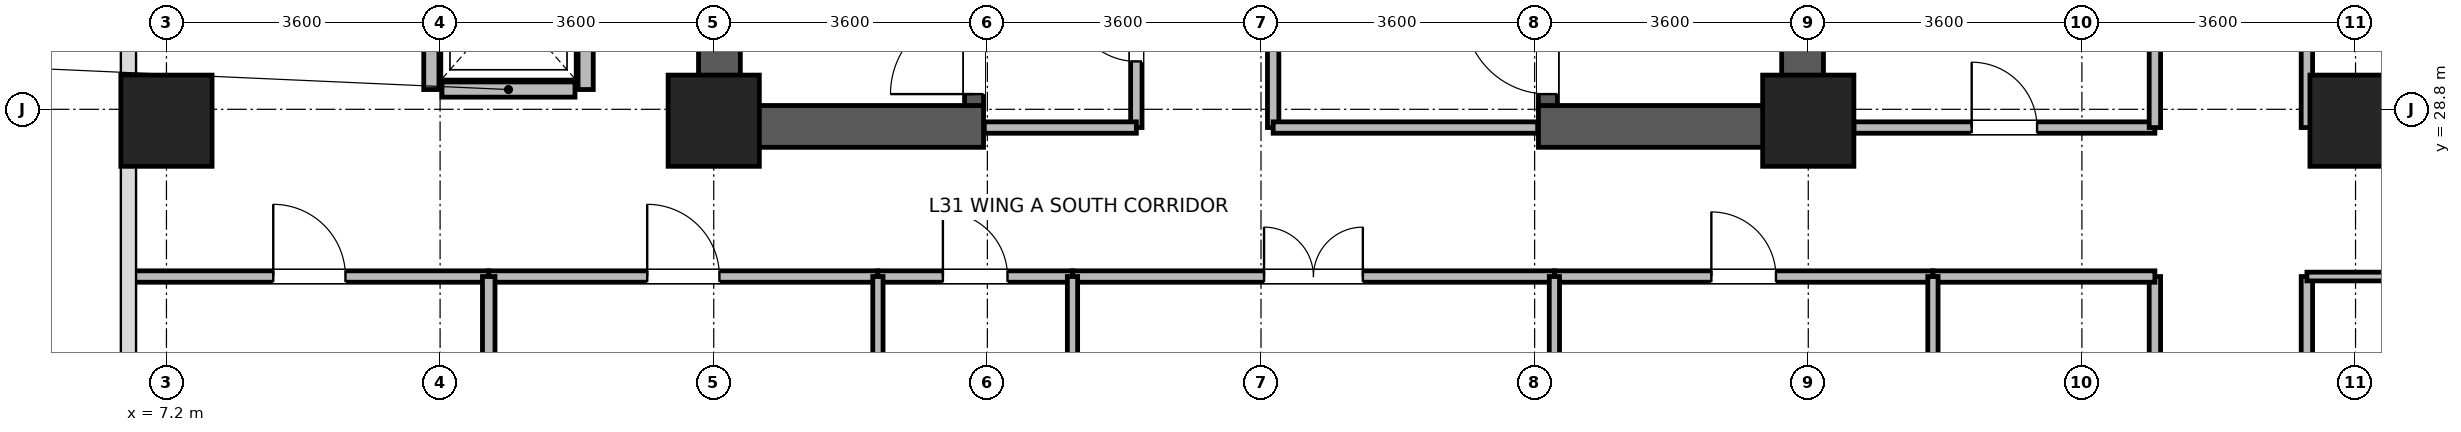
"""IFC4 building model, lengths in metres.
Left out: names, types, materials, properties, quantities, classifications, styles, units other than length and angle.
Written with IfcOpenShell. Run it as: python <this file> out.ifc"""

import sys

from ifc_helpers import new_model, si_unit, direction, frame, frame_2d, origin, origin_2d, place, context, subcontext, project, spatial, rectangle, extrude, source, transform, mapped, element, fill, save


model = new_model("IFC4")
c1 = context("Model", 3, precision=1e-05, world=origin(), true_north=direction((0.0, 1.0)))
c2 = subcontext(c1, "Body", "Model", "MODEL_VIEW")
j1 = project(units=[si_unit("LENGTHUNIT", "METRE"), si_unit("PLANEANGLEUNIT", "RADIAN")], contexts=[c1])
p1 = place(None, origin())
s1 = spatial("IfcSite", under=j1, at=p1, CompositionType="ELEMENT")
p2 = place(p1, origin())
s2 = spatial("IfcBuilding", under=s1, at=p2, CompositionType="ELEMENT")
p3 = place(p2, frame((0.0, 0.0, 123.0)))
s3 = spatial("IfcBuildingStorey", under=s2, at=p3, CompositionType="ELEMENT", Elevation=123.0)
for number, where, z_axis, x_axis in (
    (1, (14.475, 28.3, 0.0), (0.0, 0.0, 1.0), (0.0, 1.0, 0.0)),
    (2, (28.725, 28.3, 0.0), (0.0, 0.0, 1.0), (0.0, 1.0, 0.0)),
):
    element("IfcWall", number, at=place(p3, frame(where, z_axis=z_axis, x_axis=x_axis)), inside=s3, PredefinedType="SHEAR", context=c2, shape_type="SweptSolid", body=[
        extrude(rectangle(XDim=8.1, YDim=0.55, at=frame_2d((4.05, 0.0))), origin(), (0.0, 0.0, 1.0), 3.45),
    ])
for number, where, z_axis, x_axis in (
    (3, (14.75, 28.575, 0.0), (0.0, 0.0, 1.0), (1.0, 0.0, 0.0)),
    (4, (25.25, 28.575, 0.0), (0.0, 0.0, 1.0), (1.0, 0.0, 0.0)),
):
    element("IfcWall", number, at=place(p3, frame(where, z_axis=z_axis, x_axis=x_axis)), inside=s3, PredefinedType="SHEAR", context=c2, shape_type="SweptSolid", body=[
        extrude(rectangle(XDim=3.2, YDim=0.55, at=frame_2d((1.6, 0.0))), origin(), (0.0, 0.0, 1.0), 3.45),
    ])
p4 = place(p3, frame((17.825, 28.85, 0.0), z_axis=(0.0, 0.0, 1.0), x_axis=(0.0, 1.0, 0.0)))
e5 = element("IfcWall", 5, at=p4, inside=s3, PredefinedType="SHEAR", context=c2, shape_type="SweptSolid", body=[
    extrude(rectangle(XDim=7.0, YDim=0.25, at=frame_2d((3.5, 0.0))), origin(), (0.0, 0.0, 1.0), 3.45),
])
p5 = place(p4, frame((0.15, 0.0, 0.0)))
e6 = element("IfcOpeningElement", 6, at=p5, cuts=e5, PredefinedType="OPENING", context=c2, shape_type="SweptSolid", body=[
    extrude(rectangle(XDim=1.1, YDim=2.08, at=frame_2d((0.55, 1.04))), frame((0.0, 0.135, 0.0), z_axis=(0.0, -1.0, 0.0), x_axis=(1.0, 0.0, 0.0)), (0.0, 0.0, 1.0), 0.27),
])
p6 = place(p3, frame((25.375, 28.85, 0.0), z_axis=(0.0, 0.0, 1.0), x_axis=(0.0, 1.0, 0.0)))
e7 = element("IfcWall", 7, at=p6, inside=s3, PredefinedType="SHEAR", context=c2, shape_type="SweptSolid", body=[
    extrude(rectangle(XDim=7.0, YDim=0.25, at=frame_2d((3.5, 0.0))), origin(), (0.0, 0.0, 1.0), 3.45),
])
p7 = place(p6, frame((0.15, 0.0, 0.0)))
e8 = element("IfcOpeningElement", 8, at=p7, cuts=e7, PredefinedType="OPENING", context=c2, shape_type="SweptSolid", body=[
    extrude(rectangle(XDim=1.1, YDim=2.08, at=frame_2d((0.55, 1.04))), frame((0.0, 0.135, 0.0), z_axis=(0.0, -1.0, 0.0), x_axis=(1.0, 0.0, 0.0)), (0.0, 0.0, 1.0), 0.27),
])
m1 = source(origin(), c2, "Body", "SweptSolid", [
    extrude(rectangle(XDim=1.2, YDim=1.2, at=origin_2d()), origin(), (0.0, 0.0, 1.0), 3.7),
])
for number, where, z_axis, x_axis in (
    (9, (7.2, 28.65, 0.0), (0.0, 0.0, 1.0), (1.0, 0.0, 0.0)),
    (10, (14.4, 28.65, 0.0), (0.0, 0.0, 1.0), (1.0, 0.0, 0.0)),
    (11, (28.8, 28.65, 0.0), (0.0, 0.0, 1.0), (1.0, 0.0, 0.0)),
    (12, (36.0, 28.65, 0.0), (0.0, 0.0, 1.0), (1.0, 0.0, 0.0)),
):
    element("IfcColumn", number, at=place(p3, frame(where, z_axis=z_axis, x_axis=x_axis)), inside=s3, PredefinedType="COLUMN", context=c2, shape_type="MappedRepresentation", body=[
        mapped(m1, transform((0.0, 0.0, 0.0), x_axis=(1.0, 0.0, 0.0), y_axis=(0.0, 1.0, 0.0), z_axis=(0.0, 0.0, 1.0), scale=1.0)),
    ])
p8 = place(p3, frame((10.825, 29.06, 0.0), z_axis=(0.0, 0.0, 1.0), x_axis=(1.0, 0.0, 0.0)))
e13 = element("IfcWall", 13, at=p8, inside=s3, PredefinedType="PARTITIONING", context=c2, shape_type="SweptSolid", body=[
    extrude(rectangle(XDim=1.75, YDim=0.2, at=frame_2d((0.875, 0.0))), origin(), (0.0, 0.0, 1.0), 3.43),
])
for number, where, z_axis, x_axis in (
    (14, (10.685, 29.06, 0.0), (0.0, 0.0, 1.0), (0.0, 1.0, 0.0)),
    (15, (12.715, 29.06, 0.0), (0.0, 0.0, 1.0), (0.0, 1.0, 0.0)),
):
    element("IfcWall", number, at=place(p3, frame(where, z_axis=z_axis, x_axis=x_axis)), inside=s3, PredefinedType="PARTITIONING", context=c2, shape_type="SweptSolid", body=[
        extrude(rectangle(XDim=2.28, YDim=0.2, at=frame_2d((1.14, 0.0))), origin(), (0.0, 0.0, 1.0), 3.43),
    ])
p9 = place(p3, frame((35.36, 16.96, 0.0), z_axis=(0.0, 0.0, 1.0), x_axis=(0.0, 1.0, 0.0)))
e16 = element("IfcWall", 16, at=p9, inside=s3, PredefinedType="PARTITIONING", context=c2, shape_type="SweptSolid", body=[
    extrude(rectangle(XDim=9.64, YDim=0.15, at=frame_2d((4.82, 0.0))), origin(), (0.0, 0.0, 1.0), 3.43),
])
p10 = place(p9, frame((2.435, 0.0, 0.0)))
e17 = element("IfcOpeningElement", 17, at=p10, cuts=e16, PredefinedType="OPENING", context=c2, shape_type="SweptSolid", body=[
    extrude(rectangle(XDim=1.3, YDim=2.12, at=frame_2d((0.65, 1.06))), frame((0.0, 0.085, 0.0), z_axis=(0.0, -1.0, 0.0), x_axis=(1.0, 0.0, 0.0)), (0.0, 0.0, 1.0), 0.17),
])
p11 = place(p3, frame((35.36, 28.56, 0.0), z_axis=(0.0, 0.0, 1.0), x_axis=(0.0, 1.0, 0.0)))
e18 = element("IfcWall", 18, at=p11, inside=s3, PredefinedType="PARTITIONING", context=c2, shape_type="SweptSolid", body=[
    extrude(rectangle(XDim=7.68, YDim=0.15, at=frame_2d((3.84, 0.0))), origin(), (0.0, 0.0, 1.0), 3.43),
])
p12 = place(p11, frame((3.19, 0.0, 0.0)))
e19 = element("IfcOpeningElement", 19, at=p12, cuts=e18, PredefinedType="OPENING", context=c2, shape_type="SweptSolid", body=[
    extrude(rectangle(XDim=1.3, YDim=2.12, at=frame_2d((0.65, 1.06))), frame((0.0, 0.085, 0.0), z_axis=(0.0, -1.0, 0.0), x_axis=(1.0, 0.0, 0.0)), (0.0, 0.0, 1.0), 0.17),
])
p13 = place(p3, frame((19.12, 26.6, 0.0), z_axis=(0.0, 0.0, 1.0), x_axis=(1.0, 0.0, 0.0)))
e20 = element("IfcWall", 20, at=p13, inside=s3, PredefinedType="PARTITIONING", context=c2, shape_type="SweptSolid", body=[
    extrude(rectangle(XDim=6.34, YDim=0.15, at=frame_2d((3.17, 0.0))), origin(), (0.0, 0.0, 1.0), 3.43),
])
p14 = place(p13, frame((2.52, 0.0, 0.0)))
e21 = element("IfcOpeningElement", 21, at=p14, cuts=e20, PredefinedType="OPENING", context=c2, shape_type="SweptSolid", body=[
    extrude(rectangle(XDim=1.3, YDim=2.12, at=frame_2d((0.65, 1.06))), frame((0.0, 0.085, 0.0), z_axis=(0.0, -1.0, 0.0), x_axis=(1.0, 0.0, 0.0)), (0.0, 0.0, 1.0), 0.17),
])
p15 = place(p3, frame((11.44, 26.6, 0.0), z_axis=(0.0, 0.0, 1.0), x_axis=(1.0, 0.0, 0.0)))
e22 = element("IfcWall", 22, at=p15, inside=s3, PredefinedType="PARTITIONING", context=c2, shape_type="SweptSolid", body=[
    extrude(rectangle(XDim=5.12, YDim=0.15, at=frame_2d((2.56, 0.0))), origin(), (0.0, 0.0, 1.0), 3.43),
])
p16 = place(p15, frame((2.085, 0.0, 0.0)))
e23 = element("IfcOpeningElement", 23, at=p16, cuts=e22, PredefinedType="OPENING", context=c2, shape_type="SweptSolid", body=[
    extrude(rectangle(XDim=0.95, YDim=2.1, at=frame_2d((0.475, 1.05))), frame((0.0, 0.085, 0.0), z_axis=(0.0, -1.0, 0.0), x_axis=(1.0, 0.0, 0.0)), (0.0, 0.0, 1.0), 0.17),
])
p17 = place(p3, frame((33.36, 21.6, 0.0), z_axis=(0.0, 0.0, 1.0), x_axis=(0.0, 1.0, 0.0)))
e24 = element("IfcWall", 24, at=p17, inside=s3, PredefinedType="PARTITIONING", context=c2, shape_type="SweptSolid", body=[
    extrude(rectangle(XDim=5.0, YDim=0.15, at=frame_2d((2.5, 0.0))), origin(), (0.0, 0.0, 1.0), 3.43),
])
p18 = place(p17, frame((2.07, 0.0, 0.0)))
e25 = element("IfcOpeningElement", 25, at=p18, cuts=e24, PredefinedType="OPENING", context=c2, shape_type="SweptSolid", body=[
    extrude(rectangle(XDim=0.86, YDim=2.02, at=frame_2d((0.43, 1.01))), frame((0.0, 0.085, 0.0), z_axis=(0.0, -1.0, 0.0), x_axis=(1.0, 0.0, 0.0)), (0.0, 0.0, 1.0), 0.17),
])
p19 = place(p3, frame((25.46, 26.6, 0.0), z_axis=(0.0, 0.0, 1.0), x_axis=(1.0, 0.0, 0.0)))
e26 = element("IfcWall", 26, at=p19, inside=s3, PredefinedType="PARTITIONING", context=c2, shape_type="SweptSolid", body=[
    extrude(rectangle(XDim=4.98, YDim=0.15, at=frame_2d((2.49, 0.0))), origin(), (0.0, 0.0, 1.0), 3.43),
])
p20 = place(p19, frame((2.065, 0.0, 0.0)))
e27 = element("IfcOpeningElement", 27, at=p20, cuts=e26, PredefinedType="OPENING", context=c2, shape_type="SweptSolid", body=[
    extrude(rectangle(XDim=0.85, YDim=2.04, at=frame_2d((0.425, 1.02))), frame((0.0, 0.085, 0.0), z_axis=(0.0, -1.0, 0.0), x_axis=(1.0, 0.0, 0.0)), (0.0, 0.0, 1.0), 0.17),
])
p21 = place(p3, frame((6.72, 26.6, 0.0), z_axis=(0.0, 0.0, 1.0), x_axis=(1.0, 0.0, 0.0)))
e28 = element("IfcWall", 28, at=p21, inside=s3, PredefinedType="PARTITIONING", context=c2, shape_type="SweptSolid", body=[
    extrude(rectangle(XDim=4.72, YDim=0.15, at=frame_2d((2.36, 0.0))), origin(), (0.0, 0.0, 1.0), 3.43),
])
p22 = place(p21, frame((1.885, 0.0, 0.0)))
e29 = element("IfcOpeningElement", 29, at=p22, cuts=e28, PredefinedType="OPENING", context=c2, shape_type="SweptSolid", body=[
    extrude(rectangle(XDim=0.95, YDim=2.1, at=frame_2d((0.475, 1.05))), frame((0.0, 0.085, 0.0), z_axis=(0.0, -1.0, 0.0), x_axis=(1.0, 0.0, 0.0)), (0.0, 0.0, 1.0), 0.17),
])
p23 = place(p3, frame((29.4, 28.56, 0.0), z_axis=(0.0, 0.0, 1.0), x_axis=(1.0, 0.0, 0.0)))
e30 = element("IfcWall", 30, at=p23, inside=s3, PredefinedType="PARTITIONING", context=c2, shape_type="SweptSolid", body=[
    extrude(rectangle(XDim=3.96, YDim=0.15, at=frame_2d((1.98, 0.0))), origin(), (0.0, 0.0, 1.0), 2.78),
])
p24 = place(p23, frame((1.55, 0.0, 0.0)))
e31 = element("IfcOpeningElement", 31, at=p24, cuts=e30, PredefinedType="OPENING", context=c2, shape_type="SweptSolid", body=[
    extrude(rectangle(XDim=0.86, YDim=2.02, at=frame_2d((0.43, 1.01))), frame((0.0, 0.085, 0.0), z_axis=(0.0, -1.0, 0.0), x_axis=(1.0, 0.0, 0.0)), (0.0, 0.0, 1.0), 0.17),
])
p25 = place(p3, frame((33.36, 28.56, 0.0), z_axis=(0.0, 0.0, 1.0), x_axis=(0.0, 1.0, 0.0)))
e32 = element("IfcWall", 32, at=p25, inside=s3, PredefinedType="PARTITIONING", context=c2, shape_type="SweptSolid", body=[
    extrude(rectangle(XDim=3.84, YDim=0.15, at=frame_2d((1.92, 0.0))), origin(), (0.0, 0.0, 1.0), 3.43),
])
p26 = place(p3, frame((30.44, 26.6, 0.0), z_axis=(0.0, 0.0, 1.0), x_axis=(1.0, 0.0, 0.0)))
e33 = element("IfcWall", 33, at=p26, inside=s3, PredefinedType="PARTITIONING", context=c2, shape_type="SweptSolid", body=[
    extrude(rectangle(XDim=2.92, YDim=0.15, at=frame_2d((1.46, 0.0))), origin(), (0.0, 0.0, 1.0), 3.43),
])
p27 = place(p3, frame((19.96, 28.56, 0.0), z_axis=(0.0, 0.0, 1.0), x_axis=(0.0, 1.0, 0.0)))
e34 = element("IfcWall", 34, at=p27, inside=s3, PredefinedType="PARTITIONING", context=c2, shape_type="SweptSolid", body=[
    extrude(rectangle(XDim=2.6, YDim=0.15, at=frame_2d((1.3, 0.0))), origin(), (0.0, 0.0, 1.0), 3.43),
])
p28 = place(p27, frame((0.87, 0.0, 0.0)))
e35 = element("IfcOpeningElement", 35, at=p28, cuts=e34, PredefinedType="OPENING", context=c2, shape_type="SweptSolid", body=[
    extrude(rectangle(XDim=0.86, YDim=2.02, at=frame_2d((0.43, 1.01))), frame((0.0, 0.085, 0.0), z_axis=(0.0, -1.0, 0.0), x_axis=(1.0, 0.0, 0.0)), (0.0, 0.0, 1.0), 0.17),
])
p29 = place(p3, frame((16.56, 26.6, 0.0), z_axis=(0.0, 0.0, 1.0), x_axis=(1.0, 0.0, 0.0)))
e36 = element("IfcWall", 36, at=p29, inside=s3, PredefinedType="PARTITIONING", context=c2, shape_type="SweptSolid", body=[
    extrude(rectangle(XDim=2.56, YDim=0.15, at=frame_2d((1.28, 0.0))), origin(), (0.0, 0.0, 1.0), 3.43),
])
p30 = place(p29, frame((0.855, 0.0, 0.0)))
e37 = element("IfcOpeningElement", 37, at=p30, cuts=e36, PredefinedType="OPENING", context=c2, shape_type="SweptSolid", body=[
    extrude(rectangle(XDim=0.85, YDim=2.04, at=frame_2d((0.425, 1.02))), frame((0.0, 0.085, 0.0), z_axis=(0.0, -1.0, 0.0), x_axis=(1.0, 0.0, 0.0)), (0.0, 0.0, 1.0), 0.17),
])
p31 = place(p3, frame((17.96, 28.56, 0.0), z_axis=(0.0, 0.0, 1.0), x_axis=(1.0, 0.0, 0.0)))
e38 = element("IfcWall", 38, at=p31, inside=s3, PredefinedType="PARTITIONING", context=c2, shape_type="SweptSolid", body=[
    extrude(rectangle(XDim=2.0, YDim=0.15, at=frame_2d((1.0, 0.0))), origin(), (0.0, 0.0, 1.0), 2.43),
])
p32 = place(p3, frame((11.44, 21.732, 0.0), z_axis=(0.0, 0.0, 1.0), x_axis=(0.0, 1.0, 0.0)))
e39 = element("IfcWall", 39, at=p32, inside=s3, PredefinedType="PARTITIONING", context=c2, shape_type="SweptSolid", body=[
    extrude(rectangle(XDim=4.868, YDim=0.165, at=frame_2d((2.434, 0.0))), origin(), (0.0, 0.0, 1.0), 3.43),
])
for number, where, z_axis, x_axis in (
    (40, (16.56, 21.732, 0.0), (0.0, 0.0, 1.0), (0.0, 1.0, 0.0)),
    (41, (19.12, 21.732, 0.0), (0.0, 0.0, 1.0), (0.0, 1.0, 0.0)),
    (42, (25.46, 21.732, 0.0), (0.0, 0.0, 1.0), (0.0, 1.0, 0.0)),
    (43, (30.44, 21.732, 0.0), (0.0, 0.0, 1.0), (0.0, 1.0, 0.0)),
):
    element("IfcWall", number, at=place(p3, frame(where, z_axis=z_axis, x_axis=x_axis)), inside=s3, PredefinedType="PARTITIONING", context=c2, shape_type="SweptSolid", body=[
        extrude(rectangle(XDim=4.868, YDim=0.135, at=frame_2d((2.434, 0.0))), origin(), (0.0, 0.0, 1.0), 3.43),
    ])
p33 = place(p3, frame((21.76, 28.56, 0.0), z_axis=(0.0, 0.0, 1.0), x_axis=(0.0, 1.0, 0.0)))
e44 = element("IfcWall", 44, at=p33, inside=s3, PredefinedType="PARTITIONING", context=c2, shape_type="SweptSolid", body=[
    extrude(rectangle(XDim=4.6, YDim=0.15, at=frame_2d((2.3, 0.0))), origin(), (0.0, 0.0, 1.0), 3.43),
])
p34 = place(p33, frame((1.55, 0.0, 0.0)))
e45 = element("IfcOpeningElement", 45, at=p34, cuts=e44, PredefinedType="OPENING", context=c2, shape_type="SweptSolid", body=[
    extrude(rectangle(XDim=1.5, YDim=2.1, at=frame_2d((0.75, 1.05))), frame((0.0, 0.085, 0.0), z_axis=(0.0, -1.0, 0.0), x_axis=(1.0, 0.0, 0.0)), (0.0, 0.0, 1.0), 0.17),
])
p35 = place(p3, frame((21.76, 28.56, 0.0), z_axis=(0.0, 0.0, 1.0), x_axis=(1.0, 0.0, 0.0)))
e46 = element("IfcWall", 46, at=p35, inside=s3, PredefinedType="PARTITIONING", context=c2, shape_type="SweptSolid", body=[
    extrude(rectangle(XDim=3.48, YDim=0.15, at=frame_2d((1.74, 0.0))), origin(), (0.0, 0.0, 1.0), 2.43),
])
p36 = place(p3, frame((35.36, 26.6, 0.0), z_axis=(0.0, 0.0, 1.0), x_axis=(1.0, 0.0, 0.0)))
e47 = element("IfcWall", 47, at=p36, inside=s3, PredefinedType="PARTITIONING", context=c2, shape_type="SweptSolid", body=[
    extrude(rectangle(XDim=3.26, YDim=0.115, at=frame_2d((1.63, 0.0))), origin(), (0.0, 0.0, 1.0), 3.43),
])
p37 = place(p5, origin())
e48 = element("IfcDoor", 48, at=p37, inside=s3, OperationType="SINGLE_SWING_LEFT", PredefinedType="DOOR", context=c2, shape_type="SweptSolid", body=[
    extrude(rectangle(XDim=1.1, YDim=2.08, at=frame_2d((0.55, 1.04))), frame((0.0, 0.025, 0.0), z_axis=(0.0, -1.0, 0.0), x_axis=(1.0, 0.0, 0.0)), (0.0, 0.0, 1.0), 0.05),
])
fill(e6, e48)
p38 = place(p7, origin())
e49 = element("IfcDoor", 49, at=p38, inside=s3, OperationType="SINGLE_SWING_RIGHT", PredefinedType="DOOR", context=c2, shape_type="SweptSolid", body=[
    extrude(rectangle(XDim=1.1, YDim=2.08, at=frame_2d((0.55, 1.04))), frame((0.0, 0.025, 0.0), z_axis=(0.0, -1.0, 0.0), x_axis=(1.0, 0.0, 0.0)), (0.0, 0.0, 1.0), 0.05),
])
fill(e8, e49)
p39 = place(p14, origin())
e50 = element("IfcDoor", 50, at=p39, inside=s3, OperationType="DOUBLE_DOOR_SINGLE_SWING", PredefinedType="DOOR", context=c2, shape_type="SweptSolid", body=[
    extrude(rectangle(XDim=1.3, YDim=2.12, at=frame_2d((0.65, 1.06))), frame((0.0, 0.025, 0.0), z_axis=(0.0, -1.0, 0.0), x_axis=(1.0, 0.0, 0.0)), (0.0, 0.0, 1.0), 0.05),
])
fill(e21, e50)
p40 = place(p16, origin())
e51 = element("IfcDoor", 51, at=p40, inside=s3, OperationType="SINGLE_SWING_LEFT", PredefinedType="DOOR", context=c2, shape_type="SweptSolid", body=[
    extrude(rectangle(XDim=0.95, YDim=2.1, at=frame_2d((0.475, 1.05))), frame((0.0, 0.025, 0.0), z_axis=(0.0, -1.0, 0.0), x_axis=(1.0, 0.0, 0.0)), (0.0, 0.0, 1.0), 0.05),
])
fill(e23, e51)
p41 = place(p20, origin())
e52 = element("IfcDoor", 52, at=p41, inside=s3, OperationType="SINGLE_SWING_LEFT", PredefinedType="DOOR", context=c2, shape_type="SweptSolid", body=[
    extrude(rectangle(XDim=0.85, YDim=2.04, at=frame_2d((0.425, 1.02))), frame((0.0, 0.025, 0.0), z_axis=(0.0, -1.0, 0.0), x_axis=(1.0, 0.0, 0.0)), (0.0, 0.0, 1.0), 0.05),
])
fill(e27, e52)
p42 = place(p22, origin())
e53 = element("IfcDoor", 53, at=p42, inside=s3, OperationType="SINGLE_SWING_LEFT", PredefinedType="DOOR", context=c2, shape_type="SweptSolid", body=[
    extrude(rectangle(XDim=0.95, YDim=2.1, at=frame_2d((0.475, 1.05))), frame((0.0, 0.025, 0.0), z_axis=(0.0, -1.0, 0.0), x_axis=(1.0, 0.0, 0.0)), (0.0, 0.0, 1.0), 0.05),
])
fill(e29, e53)
p43 = place(p24, origin())
e54 = element("IfcDoor", 54, at=p43, inside=s3, OperationType="SINGLE_SWING_LEFT", PredefinedType="DOOR", context=c2, shape_type="SweptSolid", body=[
    extrude(rectangle(XDim=0.86, YDim=2.02, at=frame_2d((0.43, 1.01))), frame((0.0, 0.025, 0.0), z_axis=(0.0, -1.0, 0.0), x_axis=(1.0, 0.0, 0.0)), (0.0, 0.0, 1.0), 0.05),
])
fill(e31, e54)
p44 = place(p28, origin())
e55 = element("IfcDoor", 55, at=p44, inside=s3, OperationType="SINGLE_SWING_RIGHT", PredefinedType="DOOR", context=c2, shape_type="SweptSolid", body=[
    extrude(rectangle(XDim=0.86, YDim=2.02, at=frame_2d((0.43, 1.01))), frame((0.0, 0.025, 0.0), z_axis=(0.0, -1.0, 0.0), x_axis=(1.0, 0.0, 0.0)), (0.0, 0.0, 1.0), 0.05),
])
fill(e35, e55)
p45 = place(p30, origin())
e56 = element("IfcDoor", 56, at=p45, inside=s3, OperationType="SINGLE_SWING_LEFT", PredefinedType="DOOR", context=c2, shape_type="SweptSolid", body=[
    extrude(rectangle(XDim=0.85, YDim=2.04, at=frame_2d((0.425, 1.02))), frame((0.0, 0.025, 0.0), z_axis=(0.0, -1.0, 0.0), x_axis=(1.0, 0.0, 0.0)), (0.0, 0.0, 1.0), 0.05),
])
fill(e37, e56)
save(model, sys.argv[1])
